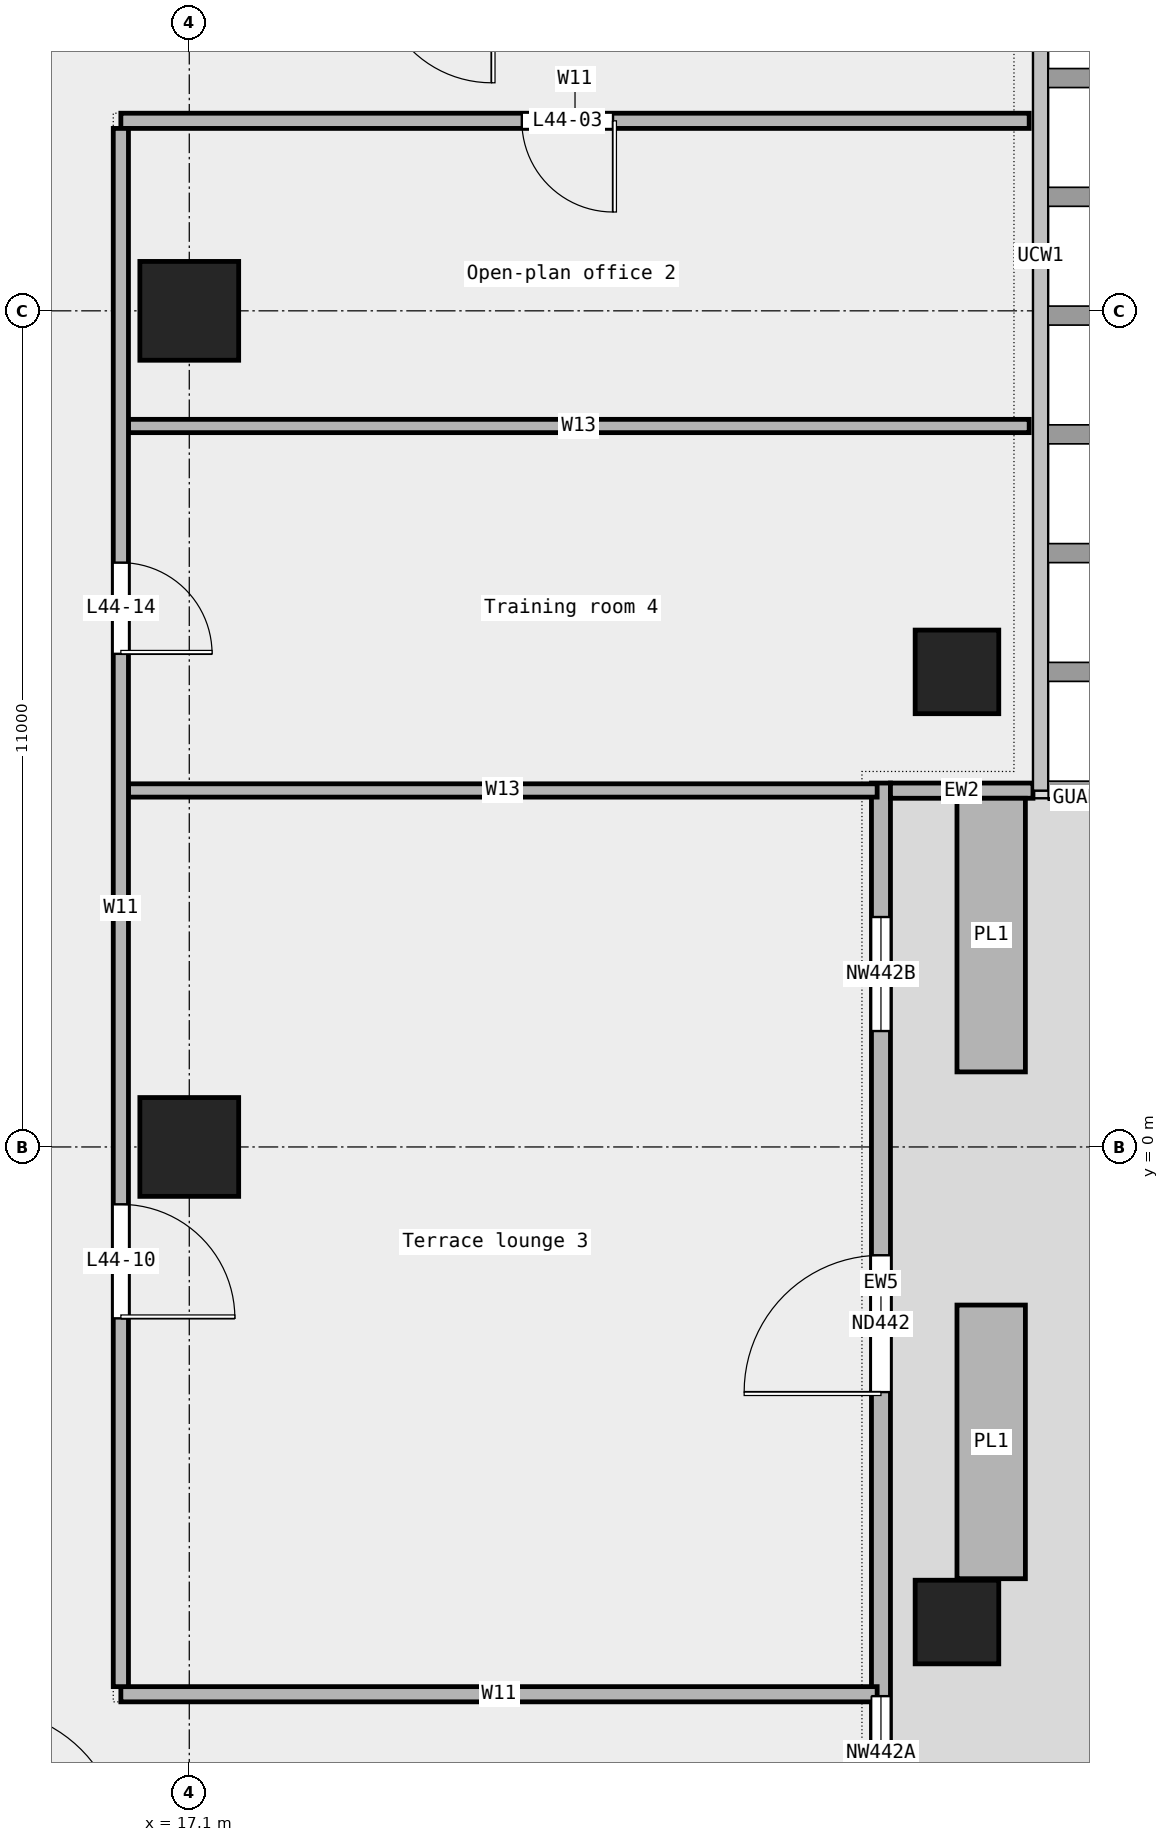
"""IFC4 building model, lengths in metres.
Left out: names, types, materials, properties, quantities, classifications, styles, units other than length and angle.
Written with IfcOpenShell. Run it as: python <this file> out.ifc"""

import sys

from ifc_helpers import new_model, si_unit, direction, frame, frame_2d, origin, origin_2d, place, context, subcontext, project, spatial, rectangle, extrude, element, fill, save


model = new_model("IFC4")
c1 = context("Model", 3, precision=1e-05, world=origin(), true_north=direction((0.0, 1.0)))
c2 = subcontext(c1, "Body", "Model", "MODEL_VIEW")
j1 = project(units=[si_unit("LENGTHUNIT", "METRE"), si_unit("PLANEANGLEUNIT", "RADIAN")], contexts=[c1])
p1 = place(None, origin())
s1 = spatial("IfcSite", under=j1, at=p1, CompositionType="ELEMENT")
p2 = place(p1, origin())
s2 = spatial("IfcBuilding", under=s1, at=p2, CompositionType="ELEMENT")
p3 = place(p2, frame((0.0, 0.0, 211.0)))
s3 = spatial("IfcBuildingStorey", under=s2, at=p3, CompositionType="ELEMENT", Elevation=211.0)
for number, where, z_axis, x_axis in (
    (1, (27.2, -6.25, 0.0), (0.0, 0.0, 1.0), (1.0, 0.0, 0.0)),
    (2, (27.2, 6.25, 0.0), (0.0, 0.0, 1.0), (1.0, 0.0, 0.0)),
):
    element("IfcColumn", number, at=place(p3, frame(where, z_axis=z_axis, x_axis=x_axis)), inside=s3, PredefinedType="COLUMN", context=c2, shape_type="SweptSolid", body=[
        extrude(rectangle(XDim=1.1, YDim=1.1, at=origin_2d()), origin(), (0.0, 0.0, 1.0), 3.6),
    ])
for number, where, z_axis, x_axis in (
    (3, (17.1, 0.0, 0.0), (0.0, 0.0, 1.0), (1.0, 0.0, 0.0)),
    (4, (17.1, 11.0, 0.0), (0.0, 0.0, 1.0), (1.0, 0.0, 0.0)),
):
    element("IfcColumn", number, at=place(p3, frame(where, z_axis=z_axis, x_axis=x_axis)), inside=s3, PredefinedType="COLUMN", context=c2, shape_type="SweptSolid", body=[
        extrude(rectangle(XDim=1.3, YDim=1.3, at=origin_2d()), origin(), (0.0, 0.0, 1.0), 3.6),
    ])
p4 = place(p3, frame((26.2, -9.475, 0.0), z_axis=(0.0, 0.0, 1.0), x_axis=(0.0, 1.0, 0.0)))
e5 = element("IfcWall", 5, at=p4, inside=s3, PredefinedType="STANDARD", context=c2, shape_type="SweptSolid", body=[
    extrude(rectangle(XDim=14.263, YDim=0.25, at=frame_2d((7.131, 0.0))), origin(), (0.0, 0.0, 1.0), 3.6),
])
p5 = place(p4, frame((0.75, 0.0, 0.45)))
e6 = element("IfcOpeningElement", 6, at=p5, cuts=e5, PredefinedType="OPENING", context=c2, shape_type="SweptSolid", body=[
    extrude(rectangle(XDim=1.5, YDim=2.4, at=frame_2d((0.75, 1.2))), frame((0.0, 0.137, 0.0), z_axis=(0.0, -1.0, 0.0), x_axis=(1.0, 0.0, 0.0)), (0.0, 0.0, 1.0), 0.274),
])
p6 = place(p4, frame((6.25, 0.0, 0.0)))
e7 = element("IfcOpeningElement", 7, at=p6, cuts=e5, PredefinedType="OPENING", context=c2, shape_type="SweptSolid", body=[
    extrude(rectangle(XDim=1.8, YDim=2.4, at=frame_2d((0.9, 1.2))), frame((0.0, 0.137, 0.0), z_axis=(0.0, -1.0, 0.0), x_axis=(1.0, 0.0, 0.0)), (0.0, 0.0, 1.0), 0.274),
])
p7 = place(p4, frame((11.0, 0.0, 0.45)))
e8 = element("IfcOpeningElement", 8, at=p7, cuts=e5, PredefinedType="OPENING", context=c2, shape_type="SweptSolid", body=[
    extrude(rectangle(XDim=1.5, YDim=2.4, at=frame_2d((0.75, 1.2))), frame((0.0, 0.137, 0.0), z_axis=(0.0, -1.0, 0.0), x_axis=(1.0, 0.0, 0.0)), (0.0, 0.0, 1.0), 0.274),
])
p8 = place(p3, frame((28.2, 4.688, 0.0), z_axis=(0.0, 0.0, 1.0), x_axis=(-1.0, 0.0, 0.0)))
e9 = element("IfcWall", 9, at=p8, inside=s3, PredefinedType="STANDARD", context=c2, shape_type="SweptSolid", body=[
    extrude(rectangle(XDim=1.875, YDim=0.2, at=frame_2d((0.938, 0.0))), origin(), (0.0, 0.0, 1.0), 3.6),
])
for number, where, z_axis, x_axis in (
    (10, (27.65, -5.68, 0.0), (0.0, 0.0, 1.0), (0.0, 1.0, 0.0)),
    (11, (27.65, 0.988, 0.0), (0.0, 0.0, 1.0), (0.0, 1.0, 0.0)),
):
    element("IfcWall", number, at=place(p3, frame(where, z_axis=z_axis, x_axis=x_axis)), inside=s3, PredefinedType="STANDARD", context=c2, shape_type="SweptSolid", body=[
        extrude(rectangle(XDim=3.6, YDim=0.9, at=frame_2d((1.8, 0.0))), origin(), (0.0, 0.0, 1.0), 0.7),
    ])
p9 = place(p3, frame((16.2, -7.2, 0.0), z_axis=(0.0, 0.0, 1.0), x_axis=(1.0, 0.0, 0.0)))
e12 = element("IfcWall", 12, at=p9, inside=s3, PredefinedType="PARTITIONING", context=c2, shape_type="SweptSolid", body=[
    extrude(rectangle(XDim=9.95, YDim=0.2, at=frame_2d((4.975, 0.0))), origin(), (0.0, 0.0, 1.0), 3.6),
])
p10 = place(p3, frame((16.3, 4.69, 0.0), z_axis=(0.0, 0.0, 1.0), x_axis=(1.0, 0.0, 0.0)))
e13 = element("IfcWall", 13, at=p10, inside=s3, PredefinedType="PARTITIONING", context=c2, shape_type="SweptSolid", body=[
    extrude(rectangle(XDim=9.85, YDim=0.175, at=frame_2d((4.925, 0.0))), origin(), (0.0, 0.0, 1.0), 3.6),
])
p11 = place(p3, frame((16.3, 9.485, 0.0), z_axis=(0.0, 0.0, 1.0), x_axis=(1.0, 0.0, 0.0)))
e14 = element("IfcWall", 14, at=p11, inside=s3, PredefinedType="PARTITIONING", context=c2, shape_type="SweptSolid", body=[
    extrude(rectangle(XDim=11.85, YDim=0.175, at=frame_2d((5.925, 0.0))), origin(), (0.0, 0.0, 1.0), 3.6),
])
p12 = place(p3, frame((16.2, 13.5, 0.0), z_axis=(0.0, 0.0, 1.0), x_axis=(1.0, 0.0, 0.0)))
e15 = element("IfcWall", 15, at=p12, inside=s3, PredefinedType="PARTITIONING", context=c2, shape_type="SweptSolid", body=[
    extrude(rectangle(XDim=11.95, YDim=0.2, at=frame_2d((5.975, 0.0))), origin(), (0.0, 0.0, 1.0), 3.6),
])
p13 = place(p12, frame((5.275, 0.0, 0.0)))
e16 = element("IfcOpeningElement", 16, at=p13, cuts=e15, PredefinedType="OPENING", context=c2, shape_type="SweptSolid", body=[
    extrude(rectangle(XDim=1.2, YDim=2.1, at=frame_2d((0.6, 1.05))), frame((0.0, 0.112, 0.0), z_axis=(0.0, -1.0, 0.0), x_axis=(1.0, 0.0, 0.0)), (0.0, 0.0, 1.0), 0.224),
])
p14 = place(p3, frame((16.2, -7.1, 0.0), z_axis=(0.0, 0.0, 1.0), x_axis=(0.0, 1.0, 0.0)))
e17 = element("IfcWall", 17, at=p14, inside=s3, PredefinedType="PARTITIONING", context=c2, shape_type="SweptSolid", body=[
    extrude(rectangle(XDim=20.5, YDim=0.2, at=frame_2d((10.25, 0.0))), origin(), (0.0, 0.0, 1.0), 3.6),
])
p15 = place(p14, frame((4.845, 0.0, 0.0)))
e18 = element("IfcOpeningElement", 18, at=p15, cuts=e17, PredefinedType="OPENING", context=c2, shape_type="SweptSolid", body=[
    extrude(rectangle(XDim=1.5, YDim=2.1, at=frame_2d((0.75, 1.05))), frame((0.0, 0.112, 0.0), z_axis=(0.0, -1.0, 0.0), x_axis=(1.0, 0.0, 0.0)), (0.0, 0.0, 1.0), 0.224),
])
p16 = place(p14, frame((13.587, 0.0, 0.0)))
e19 = element("IfcOpeningElement", 19, at=p16, cuts=e17, PredefinedType="OPENING", context=c2, shape_type="SweptSolid", body=[
    extrude(rectangle(XDim=1.2, YDim=2.1, at=frame_2d((0.6, 1.05))), frame((0.0, 0.112, 0.0), z_axis=(0.0, -1.0, 0.0), x_axis=(1.0, 0.0, 0.0)), (0.0, 0.0, 1.0), 0.224),
])
p17 = place(p5, origin())
e20 = element("IfcWindow", 20, at=p17, inside=s3, PartitioningType="SINGLE_PANEL", PredefinedType="WINDOW", context=c2, shape_type="SweptSolid", body=[
    extrude(rectangle(XDim=1.5, YDim=2.4, at=frame_2d((0.75, 1.2))), frame((0.0, 0.03, 0.0), z_axis=(0.0, -1.0, 0.0), x_axis=(1.0, 0.0, 0.0)), (0.0, 0.0, 1.0), 0.06),
])
fill(e6, e20)
p18 = place(p6, origin())
e21 = element("IfcDoor", 21, at=p18, inside=s3, OperationType="DOUBLE_DOOR_SINGLE_SWING", PredefinedType="DOOR", context=c2, shape_type="SweptSolid", body=[
    extrude(rectangle(XDim=1.8, YDim=2.4, at=frame_2d((0.9, 1.2))), frame((0.0, 0.025, 0.0), z_axis=(0.0, -1.0, 0.0), x_axis=(1.0, 0.0, 0.0)), (0.0, 0.0, 1.0), 0.05),
])
fill(e7, e21)
p19 = place(p7, origin())
e22 = element("IfcWindow", 22, at=p19, inside=s3, PartitioningType="SINGLE_PANEL", PredefinedType="WINDOW", context=c2, shape_type="SweptSolid", body=[
    extrude(rectangle(XDim=1.5, YDim=2.4, at=frame_2d((0.75, 1.2))), frame((0.0, 0.03, 0.0), z_axis=(0.0, -1.0, 0.0), x_axis=(1.0, 0.0, 0.0)), (0.0, 0.0, 1.0), 0.06),
])
fill(e8, e22)
p20 = place(p13, origin())
e23 = element("IfcDoor", 23, at=p20, inside=s3, OperationType="SINGLE_SWING_LEFT", PredefinedType="DOOR", context=c2, shape_type="SweptSolid", body=[
    extrude(rectangle(XDim=1.2, YDim=2.1, at=frame_2d((0.6, 1.05))), frame((0.0, 0.025, 0.0), z_axis=(0.0, -1.0, 0.0), x_axis=(1.0, 0.0, 0.0)), (0.0, 0.0, 1.0), 0.05),
])
fill(e16, e23)
p21 = place(p15, origin())
e24 = element("IfcDoor", 24, at=p21, inside=s3, OperationType="DOUBLE_DOOR_SINGLE_SWING", PredefinedType="DOOR", context=c2, shape_type="SweptSolid", body=[
    extrude(rectangle(XDim=1.5, YDim=2.1, at=frame_2d((0.75, 1.05))), frame((0.0, 0.025, 0.0), z_axis=(0.0, -1.0, 0.0), x_axis=(1.0, 0.0, 0.0)), (0.0, 0.0, 1.0), 0.05),
])
fill(e18, e24)
p22 = place(p16, origin())
e25 = element("IfcDoor", 25, at=p22, inside=s3, OperationType="SINGLE_SWING_RIGHT", PredefinedType="DOOR", context=c2, shape_type="SweptSolid", body=[
    extrude(rectangle(XDim=1.2, YDim=2.1, at=frame_2d((0.6, 1.05))), frame((0.0, 0.025, 0.0), z_axis=(0.0, -1.0, 0.0), x_axis=(1.0, 0.0, 0.0)), (0.0, 0.0, 1.0), 0.05),
])
fill(e19, e25)
save(model, sys.argv[1])
